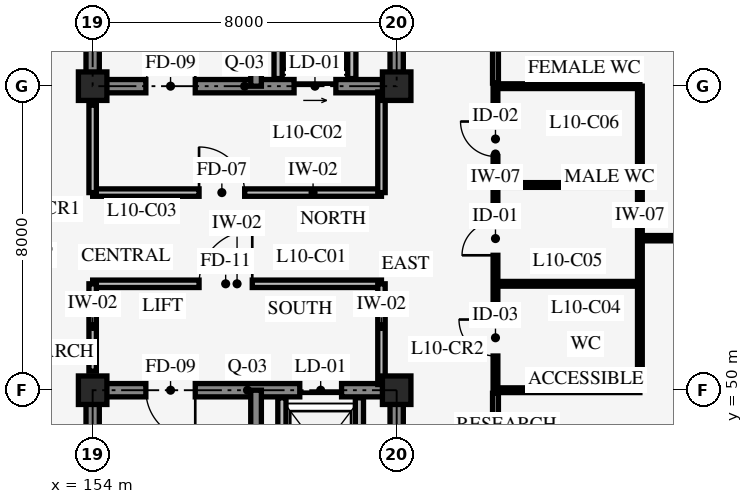
"""IFC4 building model, lengths in metres.
Left out: names, types, materials, properties, quantities, classifications, styles, units other than length and angle.
Written with IfcOpenShell. Run it as: python <this file> out.ifc"""

import sys

from ifc_helpers import new_model, si_unit, direction, frame, frame_2d, origin, origin_2d, place, context, subcontext, project, spatial, rectangle, extrude, element, fill, save


model = new_model("IFC4")
c1 = context("Model", 3, precision=1e-05, world=origin(), true_north=direction((0.0, 1.0)))
c2 = subcontext(c1, "Body", "Model", "MODEL_VIEW")
j1 = project(units=[si_unit("LENGTHUNIT", "METRE"), si_unit("PLANEANGLEUNIT", "RADIAN")], contexts=[c1])
p1 = place(None, origin())
s1 = spatial("IfcSite", under=j1, at=p1, CompositionType="ELEMENT")
p2 = place(p1, origin())
s2 = spatial("IfcBuilding", under=s1, at=p2, CompositionType="ELEMENT")
p3 = place(p2, frame((0.0, 0.0, 40.2)))
s3 = spatial("IfcBuildingStorey", under=s2, at=p3, CompositionType="ELEMENT", Elevation=40.2)
p4 = place(p3, frame((162.0, 42.0, 0.0), z_axis=(0.0, 0.0, 1.0), x_axis=(0.0, 1.0, 0.0)))
e1 = element("IfcWall", 1, at=p4, inside=s3, PredefinedType="SHEAR", context=c2, shape_type="SweptSolid", body=[
    extrude(rectangle(XDim=8.0, YDim=0.35, at=frame_2d((4.0, 0.0))), origin(), (0.0, 0.0, 1.0), 3.95),
])
p5 = place(p4, frame((3.175, 0.0, 0.0)))
e2 = element("IfcOpeningElement", 2, at=p5, cuts=e1, PredefinedType="OPENING", context=c2, shape_type="SweptSolid", body=[
    extrude(rectangle(XDim=1.05, YDim=2.2, at=frame_2d((0.525, 1.1))), frame((0.0, 0.185, 0.0), z_axis=(0.0, -1.0, 0.0), x_axis=(1.0, 0.0, 0.0)), (0.0, 0.0, 1.0), 0.37),
])
p6 = place(p3, frame((162.0, 50.0, 0.0), z_axis=(0.0, 0.0, 1.0), x_axis=(-1.0, 0.0, 0.0)))
e3 = element("IfcWall", 3, at=p6, inside=s3, PredefinedType="SHEAR", context=c2, shape_type="SweptSolid", body=[
    extrude(rectangle(XDim=8.0, YDim=0.35, at=frame_2d((4.0, 0.0))), origin(), (0.0, 0.0, 1.0), 3.95),
])
p7 = place(p6, frame((5.3, 0.0, 0.0)))
e4 = element("IfcOpeningElement", 4, at=p7, cuts=e3, PredefinedType="OPENING", context=c2, shape_type="SweptSolid", body=[
    extrude(rectangle(XDim=1.3, YDim=2.15, at=frame_2d((0.65, 1.075))), frame((0.0, 0.185, 0.0), z_axis=(0.0, -1.0, 0.0), x_axis=(1.0, 0.0, 0.0)), (0.0, 0.0, 1.0), 0.37),
])
p8 = place(p6, frame((1.45, 0.0, 0.0)))
e5 = element("IfcOpeningElement", 5, at=p8, cuts=e3, PredefinedType="OPENING", context=c2, shape_type="SweptSolid", body=[
    extrude(rectangle(XDim=1.1, YDim=2.2, at=frame_2d((0.55, 1.1))), frame((0.0, 0.185, 0.0), z_axis=(0.0, -1.0, 0.0), x_axis=(1.0, 0.0, 0.0)), (0.0, 0.0, 1.0), 0.37),
])
p9 = place(p3, frame((154.0, 50.0, 0.0), z_axis=(0.0, 0.0, 1.0), x_axis=(0.0, -1.0, 0.0)))
e6 = element("IfcWall", 6, at=p9, inside=s3, PredefinedType="SHEAR", context=c2, shape_type="SweptSolid", body=[
    extrude(rectangle(XDim=8.0, YDim=0.35, at=frame_2d((4.0, 0.0))), origin(), (0.0, 0.0, 1.0), 3.95),
])
p10 = place(p3, frame((158.3, 42.0, 0.0), z_axis=(0.0, 0.0, 1.0), x_axis=(0.0, 1.0, 0.0)))
e7 = element("IfcWall", 7, at=p10, inside=s3, PredefinedType="SHEAR", context=c2, shape_type="SweptSolid", body=[
    extrude(rectangle(XDim=8.0, YDim=0.28, at=frame_2d((4.0, 0.0))), origin(), (0.0, 0.0, 1.0), 3.95),
])
p11 = place(p3, frame((154.0, 58.0, 0.0), z_axis=(0.0, 0.0, 1.0), x_axis=(1.0, 0.0, 0.0)))
e8 = element("IfcWall", 8, at=p11, inside=s3, PredefinedType="SHEAR", context=c2, shape_type="SweptSolid", body=[
    extrude(rectangle(XDim=8.0, YDim=0.35, at=frame_2d((4.0, 0.0))), origin(), (0.0, 0.0, 1.0), 3.95),
])
p12 = place(p11, frame((1.4, 0.0, 0.0)))
e9 = element("IfcOpeningElement", 9, at=p12, cuts=e8, PredefinedType="OPENING", context=c2, shape_type="SweptSolid", body=[
    extrude(rectangle(XDim=1.3, YDim=2.15, at=frame_2d((0.65, 1.075))), frame((0.0, 0.185, 0.0), z_axis=(0.0, -1.0, 0.0), x_axis=(1.0, 0.0, 0.0)), (0.0, 0.0, 1.0), 0.37),
])
p13 = place(p11, frame((5.3, 0.0, 0.0)))
e10 = element("IfcOpeningElement", 10, at=p13, cuts=e8, PredefinedType="OPENING", context=c2, shape_type="SweptSolid", body=[
    extrude(rectangle(XDim=1.1, YDim=2.2, at=frame_2d((0.55, 1.1))), frame((0.0, 0.185, 0.0), z_axis=(0.0, -1.0, 0.0), x_axis=(1.0, 0.0, 0.0)), (0.0, 0.0, 1.0), 0.37),
])
p14 = place(p3, frame((162.0, 58.0, 0.0), z_axis=(0.0, 0.0, 1.0), x_axis=(0.0, 1.0, 0.0)))
e11 = element("IfcWall", 11, at=p14, inside=s3, PredefinedType="SHEAR", context=c2, shape_type="SweptSolid", body=[
    extrude(rectangle(XDim=8.0, YDim=0.35, at=frame_2d((4.0, 0.0))), origin(), (0.0, 0.0, 1.0), 3.95),
])
p15 = place(p14, frame((3.275, 0.0, 0.0)))
e12 = element("IfcOpeningElement", 12, at=p15, cuts=e11, PredefinedType="OPENING", context=c2, shape_type="SweptSolid", body=[
    extrude(rectangle(XDim=1.05, YDim=2.2, at=frame_2d((0.525, 1.1))), frame((0.0, 0.185, 0.0), z_axis=(0.0, -1.0, 0.0), x_axis=(1.0, 0.0, 0.0)), (0.0, 0.0, 1.0), 0.37),
])
p16 = place(p14, frame((5.45, 0.0, 0.0)))
e13 = element("IfcOpeningElement", 13, at=p16, cuts=e11, PredefinedType="OPENING", context=c2, shape_type="SweptSolid", body=[
    extrude(rectangle(XDim=1.4, YDim=2.3, at=frame_2d((0.7, 1.15))), frame((0.0, 0.185, 0.0), z_axis=(0.0, -1.0, 0.0), x_axis=(1.0, 0.0, 0.0)), (0.0, 0.0, 1.0), 0.37),
])
p17 = place(p3, frame((154.0, 66.0, 0.0), z_axis=(0.0, 0.0, 1.0), x_axis=(0.0, -1.0, 0.0)))
e14 = element("IfcWall", 14, at=p17, inside=s3, PredefinedType="SHEAR", context=c2, shape_type="SweptSolid", body=[
    extrude(rectangle(XDim=8.0, YDim=0.35, at=frame_2d((4.0, 0.0))), origin(), (0.0, 0.0, 1.0), 3.95),
])
p18 = place(p3, frame((158.3, 58.0, 0.0), z_axis=(0.0, 0.0, 1.0), x_axis=(0.0, 1.0, 0.0)))
e15 = element("IfcWall", 15, at=p18, inside=s3, PredefinedType="SHEAR", context=c2, shape_type="SweptSolid", body=[
    extrude(rectangle(XDim=8.0, YDim=0.28, at=frame_2d((4.0, 0.0))), origin(), (0.0, 0.0, 1.0), 3.95),
])
for number, where, z_axis, x_axis in (
    (16, (154.0, 50.0, 0.0), (0.0, 0.0, 1.0), (1.0, 0.0, 0.0)),
    (17, (154.0, 58.0, 0.0), (0.0, 0.0, 1.0), (1.0, 0.0, 0.0)),
    (18, (162.0, 50.0, 0.0), (0.0, 0.0, 1.0), (1.0, 0.0, 0.0)),
    (19, (162.0, 58.0, 0.0), (0.0, 0.0, 1.0), (1.0, 0.0, 0.0)),
):
    element("IfcColumn", number, at=place(p3, frame(where, z_axis=z_axis, x_axis=x_axis)), inside=s3, PredefinedType="COLUMN", context=c2, shape_type="SweptSolid", body=[
        extrude(rectangle(XDim=0.75, YDim=0.75, at=origin_2d()), origin(), (0.0, 0.0, 1.0), 4.2),
    ])
for number, where, z_axis, x_axis in (
    (20, (158.98, 47.02, 0.0), (0.0, 0.0, 1.0), (0.0, 1.0, 0.0)),
    (21, (161.02, 47.02, 0.0), (0.0, 0.0, 1.0), (0.0, 1.0, 0.0)),
):
    element("IfcWall", number, at=place(p3, frame(where, z_axis=z_axis, x_axis=x_axis)), inside=s3, PredefinedType="STANDARD", context=c2, shape_type="SweptSolid", body=[
        extrude(rectangle(XDim=2.78, YDim=0.215, at=frame_2d((1.39, 0.0))), origin(), (0.0, 0.0, 1.0), 3.9),
    ])
for number, where, z_axis, x_axis in (
    (22, (160.82, 58.2, 0.0), (0.0, 0.0, 1.0), (0.0, 1.0, 0.0)),
    (23, (158.88, 58.2, 0.0), (0.0, 0.0, 1.0), (0.0, 1.0, 0.0)),
):
    element("IfcWall", number, at=place(p3, frame(where, z_axis=z_axis, x_axis=x_axis)), inside=s3, PredefinedType="STANDARD", context=c2, shape_type="SweptSolid", body=[
        extrude(rectangle(XDim=2.55, YDim=0.215, at=frame_2d((1.275, 0.0))), origin(), (0.0, 0.0, 1.0), 3.9),
    ])
p19 = place(p3, frame((154.0, 52.8, 0.0), z_axis=(0.0, 0.0, 1.0), x_axis=(1.0, 0.0, 0.0)))
e24 = element("IfcWall", 24, at=p19, inside=s3, PredefinedType="STANDARD", context=c2, shape_type="SweptSolid", body=[
    extrude(rectangle(XDim=7.6, YDim=0.195, at=frame_2d((3.8, 0.0))), origin(), (0.0, 0.0, 1.0), 3.9),
])
p20 = place(p19, frame((2.8, 0.0, 0.0)))
e25 = element("IfcOpeningElement", 25, at=p20, cuts=e24, PredefinedType="OPENING", context=c2, shape_type="SweptSolid", body=[
    extrude(rectangle(XDim=1.4, YDim=2.2, at=frame_2d((0.7, 1.1))), frame((0.0, 0.107, 0.0), z_axis=(0.0, -1.0, 0.0), x_axis=(1.0, 0.0, 0.0)), (0.0, 0.0, 1.0), 0.215),
])
p21 = place(p3, frame((161.6, 50.15, 0.0), z_axis=(0.0, 0.0, 1.0), x_axis=(0.0, 1.0, 0.0)))
e26 = element("IfcWall", 26, at=p21, inside=s3, PredefinedType="STANDARD", context=c2, shape_type="SweptSolid", body=[
    extrude(rectangle(XDim=2.65, YDim=0.195, at=frame_2d((1.325, 0.0))), origin(), (0.0, 0.0, 1.0), 3.14),
])
p22 = place(p3, frame((154.0, 50.5, 0.0), z_axis=(0.0, 0.0, 1.0), x_axis=(0.0, 1.0, 0.0)))
e27 = element("IfcWall", 27, at=p22, inside=s3, PredefinedType="STANDARD", context=c2, shape_type="SweptSolid", body=[
    extrude(rectangle(XDim=2.3, YDim=0.195, at=frame_2d((1.15, 0.0))), origin(), (0.0, 0.0, 1.0), 3.14),
])
p23 = place(p3, frame((154.0, 55.2, 0.0), z_axis=(0.0, 0.0, 1.0), x_axis=(1.0, 0.0, 0.0)))
e28 = element("IfcWall", 28, at=p23, inside=s3, PredefinedType="STANDARD", context=c2, shape_type="SweptSolid", body=[
    extrude(rectangle(XDim=7.6, YDim=0.195, at=frame_2d((3.8, 0.0))), origin(), (0.0, 0.0, 1.0), 3.9),
])
p24 = place(p23, frame((2.8, 0.0, 0.0)))
e29 = element("IfcOpeningElement", 29, at=p24, cuts=e28, PredefinedType="OPENING", context=c2, shape_type="SweptSolid", body=[
    extrude(rectangle(XDim=1.2, YDim=2.1, at=frame_2d((0.6, 1.05))), frame((0.0, 0.107, 0.0), z_axis=(0.0, -1.0, 0.0), x_axis=(1.0, 0.0, 0.0)), (0.0, 0.0, 1.0), 0.215),
])
p25 = place(p3, frame((161.6, 55.2, 0.0), z_axis=(0.0, 0.0, 1.0), x_axis=(0.0, 1.0, 0.0)))
e30 = element("IfcWall", 30, at=p25, inside=s3, PredefinedType="STANDARD", context=c2, shape_type="SweptSolid", body=[
    extrude(rectangle(XDim=2.65, YDim=0.195, at=frame_2d((1.325, 0.0))), origin(), (0.0, 0.0, 1.0), 3.14),
])
p26 = place(p3, frame((154.0, 55.2, 0.0), z_axis=(0.0, 0.0, 1.0), x_axis=(0.0, 1.0, 0.0)))
e31 = element("IfcWall", 31, at=p26, inside=s3, PredefinedType="STANDARD", context=c2, shape_type="SweptSolid", body=[
    extrude(rectangle(XDim=2.3, YDim=0.195, at=frame_2d((1.15, 0.0))), origin(), (0.0, 0.0, 1.0), 3.14),
])
p27 = place(p3, frame((164.6, 50.0, 0.0), z_axis=(0.0, 0.0, 1.0), x_axis=(0.0, 1.0, 0.0)))
e32 = element("IfcWall", 32, at=p27, inside=s3, PredefinedType="STANDARD", context=c2, shape_type="SweptSolid", body=[
    extrude(rectangle(XDim=8.0, YDim=0.125, at=frame_2d((4.0, 0.0))), origin(), (0.0, 0.0, 1.0), 3.9),
])
p28 = place(p27, frame((0.9, 0.0, 0.0)))
e33 = element("IfcOpeningElement", 33, at=p28, cuts=e32, PredefinedType="OPENING", context=c2, shape_type="SweptSolid", body=[
    extrude(rectangle(XDim=0.96, YDim=2.08, at=frame_2d((0.48, 1.04))), frame((0.0, 0.073, 0.0), z_axis=(0.0, -1.0, 0.0), x_axis=(1.0, 0.0, 0.0)), (0.0, 0.0, 1.0), 0.145),
])
p29 = place(p27, frame((3.55, 0.0, 0.0)))
e34 = element("IfcOpeningElement", 34, at=p29, cuts=e32, PredefinedType="OPENING", context=c2, shape_type="SweptSolid", body=[
    extrude(rectangle(XDim=0.88, YDim=2.05, at=frame_2d((0.44, 1.025))), frame((0.0, 0.073, 0.0), z_axis=(0.0, -1.0, 0.0), x_axis=(1.0, 0.0, 0.0)), (0.0, 0.0, 1.0), 0.145),
])
p30 = place(p27, frame((6.15, 0.0, 0.0)))
e35 = element("IfcOpeningElement", 35, at=p30, cuts=e32, PredefinedType="OPENING", context=c2, shape_type="SweptSolid", body=[
    extrude(rectangle(XDim=0.92, YDim=2.05, at=frame_2d((0.46, 1.025))), frame((0.0, 0.073, 0.0), z_axis=(0.0, -1.0, 0.0), x_axis=(1.0, 0.0, 0.0)), (0.0, 0.0, 1.0), 0.145),
])
p31 = place(p3, frame((168.4, 50.0, 0.0), z_axis=(0.0, 0.0, 1.0), x_axis=(0.0, 1.0, 0.0)))
e36 = element("IfcWall", 36, at=p31, inside=s3, PredefinedType="STANDARD", context=c2, shape_type="SweptSolid", body=[
    extrude(rectangle(XDim=8.0, YDim=0.125, at=frame_2d((4.0, 0.0))), origin(), (0.0, 0.0, 1.0), 3.9),
])
p32 = place(p3, frame((164.6, 50.0, 0.0), z_axis=(0.0, 0.0, 1.0), x_axis=(1.0, 0.0, 0.0)))
e37 = element("IfcWall", 37, at=p32, inside=s3, PredefinedType="STANDARD", context=c2, shape_type="SweptSolid", body=[
    extrude(rectangle(XDim=3.8, YDim=0.125, at=frame_2d((1.9, 0.0))), origin(), (0.0, 0.0, 1.0), 3.09),
])
for number, where, z_axis, x_axis in (
    (38, (164.6, 52.8, 0.0), (0.0, 0.0, 1.0), (1.0, 0.0, 0.0)),
    (39, (164.6, 55.4, 0.0), (0.0, 0.0, 1.0), (1.0, 0.0, 0.0)),
):
    element("IfcWall", number, at=place(p3, frame(where, z_axis=z_axis, x_axis=x_axis)), inside=s3, PredefinedType="STANDARD", context=c2, shape_type="SweptSolid", body=[
        extrude(rectangle(XDim=3.8, YDim=0.125, at=frame_2d((1.9, 0.0))), origin(), (0.0, 0.0, 1.0), 3.9),
    ])
p33 = place(p3, frame((164.6, 58.0, 0.0), z_axis=(0.0, 0.0, 1.0), x_axis=(1.0, 0.0, 0.0)))
e40 = element("IfcWall", 40, at=p33, inside=s3, PredefinedType="STANDARD", context=c2, shape_type="SweptSolid", body=[
    extrude(rectangle(XDim=3.8, YDim=0.125, at=frame_2d((1.9, 0.0))), origin(), (0.0, 0.0, 1.0), 3.09),
])
p34 = place(p3, frame((164.6, 42.12, 0.0), z_axis=(0.0, 0.0, 1.0), x_axis=(0.0, 1.0, 0.0)))
e41 = element("IfcWall", 41, at=p34, inside=s3, PredefinedType="STANDARD", context=c2, shape_type="SweptSolid", body=[
    extrude(rectangle(XDim=7.8, YDim=0.155, at=frame_2d((3.9, 0.0))), origin(), (0.0, 0.0, 1.0), 3.9),
])
p35 = place(p34, frame((3.375, 0.0, 0.0)))
e42 = element("IfcOpeningElement", 42, at=p35, cuts=e41, PredefinedType="OPENING", context=c2, shape_type="SweptSolid", body=[
    extrude(rectangle(XDim=1.05, YDim=2.1, at=frame_2d((0.525, 1.05))), frame((0.0, 0.087, 0.0), z_axis=(0.0, -1.0, 0.0), x_axis=(1.0, 0.0, 0.0)), (0.0, 0.0, 1.0), 0.175),
])
p36 = place(p3, frame((168.4, 54.0, 0.0), z_axis=(0.0, 0.0, 1.0), x_axis=(1.0, 0.0, 0.0)))
e43 = element("IfcWall", 43, at=p36, inside=s3, PredefinedType="STANDARD", context=c2, shape_type="SweptSolid", body=[
    extrude(rectangle(XDim=8.96, YDim=0.14, at=frame_2d((4.48, 0.0))), origin(), (0.0, 0.0, 1.0), 3.9),
])
p37 = place(p36, frame((3.71, 0.0, 0.0)))
e44 = element("IfcOpeningElement", 44, at=p37, cuts=e43, PredefinedType="OPENING", context=c2, shape_type="SweptSolid", body=[
    extrude(rectangle(XDim=1.54, YDim=2.22, at=frame_2d((0.77, 1.11))), frame((0.0, 0.08, 0.0), z_axis=(0.0, -1.0, 0.0), x_axis=(1.0, 0.0, 0.0)), (0.0, 0.0, 1.0), 0.16),
])
p38 = place(p3, frame((164.6, 58.08, 0.0), z_axis=(0.0, 0.0, 1.0), x_axis=(0.0, 1.0, 0.0)))
e45 = element("IfcWall", 45, at=p38, inside=s3, PredefinedType="STANDARD", context=c2, shape_type="SweptSolid", body=[
    extrude(rectangle(XDim=7.8, YDim=0.155, at=frame_2d((3.9, 0.0))), origin(), (0.0, 0.0, 1.0), 3.9),
])
p39 = place(p38, frame((3.35, 0.0, 0.0)))
e46 = element("IfcOpeningElement", 46, at=p39, cuts=e45, PredefinedType="OPENING", context=c2, shape_type="SweptSolid", body=[
    extrude(rectangle(XDim=1.1, YDim=2.1, at=frame_2d((0.55, 1.05))), frame((0.0, 0.087, 0.0), z_axis=(0.0, -1.0, 0.0), x_axis=(1.0, 0.0, 0.0)), (0.0, 0.0, 1.0), 0.175),
])
p40 = place(p7, origin())
e47 = element("IfcDoor", 47, at=p40, inside=s3, OperationType="SINGLE_SWING_LEFT", PredefinedType="DOOR", context=c2, shape_type="SweptSolid", body=[
    extrude(rectangle(XDim=1.3, YDim=2.15, at=frame_2d((0.65, 1.075))), frame((0.0, 0.025, 0.0), z_axis=(0.0, -1.0, 0.0), x_axis=(1.0, 0.0, 0.0)), (0.0, 0.0, 1.0), 0.05),
])
fill(e4, e47)
p41 = place(p8, origin())
e48 = element("IfcDoor", 48, at=p41, inside=s3, OperationType="SLIDING_TO_LEFT", PredefinedType="DOOR", context=c2, shape_type="SweptSolid", body=[
    extrude(rectangle(XDim=1.1, YDim=2.2, at=frame_2d((0.55, 1.1))), frame((0.0, 0.025, 0.0), z_axis=(0.0, -1.0, 0.0), x_axis=(1.0, 0.0, 0.0)), (0.0, 0.0, 1.0), 0.05),
])
fill(e5, e48)
p42 = place(p12, origin())
e49 = element("IfcDoor", 49, at=p42, inside=s3, OperationType="SINGLE_SWING_RIGHT", PredefinedType="DOOR", context=c2, shape_type="SweptSolid", body=[
    extrude(rectangle(XDim=1.3, YDim=2.15, at=frame_2d((0.65, 1.075))), frame((0.0, 0.025, 0.0), z_axis=(0.0, -1.0, 0.0), x_axis=(1.0, 0.0, 0.0)), (0.0, 0.0, 1.0), 0.05),
])
fill(e9, e49)
p43 = place(p13, origin())
e50 = element("IfcDoor", 50, at=p43, inside=s3, OperationType="SLIDING_TO_RIGHT", PredefinedType="DOOR", context=c2, shape_type="SweptSolid", body=[
    extrude(rectangle(XDim=1.1, YDim=2.2, at=frame_2d((0.55, 1.1))), frame((0.0, 0.025, 0.0), z_axis=(0.0, -1.0, 0.0), x_axis=(1.0, 0.0, 0.0)), (0.0, 0.0, 1.0), 0.05),
])
fill(e10, e50)
p44 = place(p20, origin())
e51 = element("IfcDoor", 51, at=p44, inside=s3, OperationType="SINGLE_SWING_RIGHT", PredefinedType="DOOR", context=c2, shape_type="SweptSolid", body=[
    extrude(rectangle(XDim=1.4, YDim=2.2, at=frame_2d((0.7, 1.1))), frame((0.0, 0.025, 0.0), z_axis=(0.0, -1.0, 0.0), x_axis=(1.0, 0.0, 0.0)), (0.0, 0.0, 1.0), 0.05),
])
fill(e25, e51)
p45 = place(p24, origin())
e52 = element("IfcDoor", 52, at=p45, inside=s3, OperationType="SINGLE_SWING_LEFT", PredefinedType="DOOR", context=c2, shape_type="SweptSolid", body=[
    extrude(rectangle(XDim=1.2, YDim=2.1, at=frame_2d((0.6, 1.05))), frame((0.0, 0.025, 0.0), z_axis=(0.0, -1.0, 0.0), x_axis=(1.0, 0.0, 0.0)), (0.0, 0.0, 1.0), 0.05),
])
fill(e29, e52)
p46 = place(p28, origin())
e53 = element("IfcDoor", 53, at=p46, inside=s3, OperationType="SINGLE_SWING_RIGHT", PredefinedType="DOOR", context=c2, shape_type="SweptSolid", body=[
    extrude(rectangle(XDim=0.96, YDim=2.08, at=frame_2d((0.48, 1.04))), frame((0.0, 0.025, 0.0), z_axis=(0.0, -1.0, 0.0), x_axis=(1.0, 0.0, 0.0)), (0.0, 0.0, 1.0), 0.05),
])
fill(e33, e53)
p47 = place(p29, origin())
e54 = element("IfcDoor", 54, at=p47, inside=s3, OperationType="SINGLE_SWING_LEFT", PredefinedType="DOOR", context=c2, shape_type="SweptSolid", body=[
    extrude(rectangle(XDim=0.88, YDim=2.05, at=frame_2d((0.44, 1.025))), frame((0.0, 0.025, 0.0), z_axis=(0.0, -1.0, 0.0), x_axis=(1.0, 0.0, 0.0)), (0.0, 0.0, 1.0), 0.05),
])
fill(e34, e54)
p48 = place(p30, origin())
e55 = element("IfcDoor", 55, at=p48, inside=s3, OperationType="SINGLE_SWING_RIGHT", PredefinedType="DOOR", context=c2, shape_type="SweptSolid", body=[
    extrude(rectangle(XDim=0.92, YDim=2.05, at=frame_2d((0.46, 1.025))), frame((0.0, 0.025, 0.0), z_axis=(0.0, -1.0, 0.0), x_axis=(1.0, 0.0, 0.0)), (0.0, 0.0, 1.0), 0.05),
])
fill(e35, e55)
save(model, sys.argv[1])
